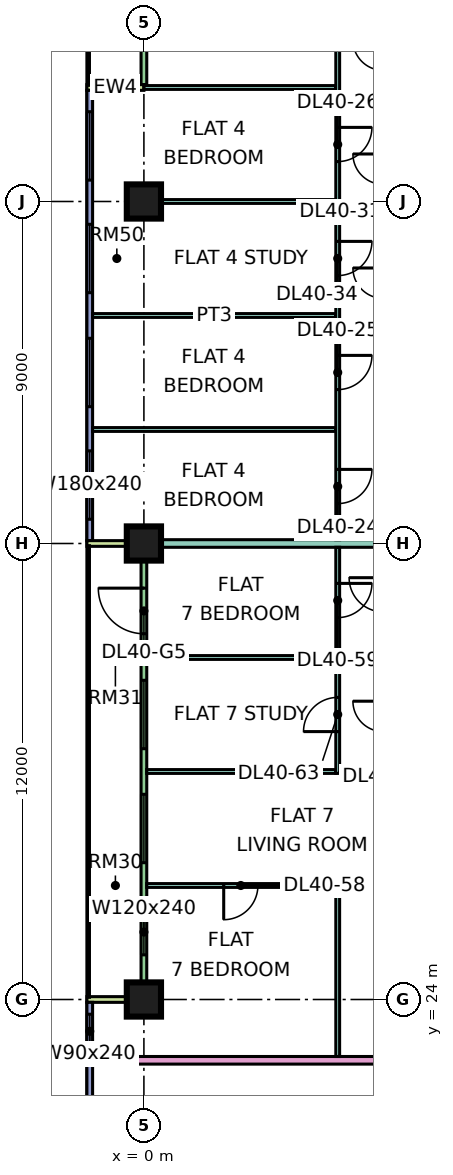
"""IFC4 building model, lengths in metres.
Left out: names, types, materials, properties, quantities, classifications, styles, units other than length and angle.
Written with IfcOpenShell. Run it as: python <this file> out.ifc"""

import sys

from ifc_helpers import new_model, si_unit, direction, frame, frame_2d, origin, origin_2d, place, context, subcontext, project, spatial, rectangle, extrude, element, fill, save


model = new_model("IFC4")
c1 = context("Model", 3, precision=1e-05, world=origin(), true_north=direction((0.0, 1.0)))
c2 = subcontext(c1, "Body", "Model", "MODEL_VIEW")
j1 = project(units=[si_unit("LENGTHUNIT", "METRE"), si_unit("PLANEANGLEUNIT", "RADIAN")], contexts=[c1])
p1 = place(None, origin())
s1 = spatial("IfcSite", under=j1, at=p1, CompositionType="ELEMENT")
p2 = place(p1, origin())
s2 = spatial("IfcBuilding", under=s1, at=p2, CompositionType="ELEMENT")
p3 = place(p2, frame((0.0, 0.0, 176.15)))
s3 = spatial("IfcBuildingStorey", under=s2, at=p3, CompositionType="ELEMENT", Elevation=176.15)
p4 = place(p3, frame((0.0, 24.0, 0.0), z_axis=(0.0, 0.0, 1.0), x_axis=(1.0, 0.0, 0.0)))
e1 = element("IfcColumn", 1, at=p4, inside=s3, PredefinedType="COLUMN", context=c2, shape_type="SweptSolid", body=[
    extrude(rectangle(XDim=0.9, YDim=0.9, at=origin_2d()), origin(), (0.0, 0.0, 1.0), 3.75),
])
p5 = place(p3, frame((0.0, 36.0, 0.0), z_axis=(0.0, 0.0, 1.0), x_axis=(1.0, 0.0, 0.0)))
e2 = element("IfcColumn", 2, at=p5, inside=s3, PredefinedType="COLUMN", context=c2, shape_type="SweptSolid", body=[
    extrude(rectangle(XDim=0.9, YDim=0.9, at=origin_2d()), origin(), (0.0, 0.0, 1.0), 3.75),
])
p6 = place(p3, frame((0.0, 45.0, 0.0), z_axis=(0.0, 0.0, 1.0), x_axis=(1.0, 0.0, 0.0)))
e3 = element("IfcColumn", 3, at=p6, inside=s3, PredefinedType="COLUMN", context=c2, shape_type="SweptSolid", body=[
    extrude(rectangle(XDim=0.9, YDim=0.9, at=origin_2d()), origin(), (0.0, 0.0, 1.0), 3.75),
])
p7 = place(p3, frame((0.0, 61.425, 0.0), z_axis=(0.0, 0.0, 1.0), x_axis=(0.0, -1.0, 0.0)))
e4 = element("IfcWall", 4, at=p7, inside=s3, PredefinedType="SOLIDWALL", context=c2, shape_type="SweptSolid", body=[
    extrude(rectangle(XDim=13.35, YDim=0.15, at=frame_2d((6.675, 0.0))), origin(), (0.0, 0.0, 1.0), 3.35),
])
p8 = place(p7, frame((0.262, 0.0, 0.45)))
e5 = element("IfcOpeningElement", 5, at=p8, cuts=e4, PredefinedType="OPENING", context=c2, shape_type="SweptSolid", body=[
    extrude(rectangle(XDim=0.9, YDim=2.4, at=frame_2d((0.45, 1.2))), frame((0.0, 0.085, 0.0), z_axis=(0.0, -1.0, 0.0), x_axis=(1.0, 0.0, 0.0)), (0.0, 0.0, 1.0), 0.17),
])
p9 = place(p7, frame((2.025, 0.0, 0.0)))
e6 = element("IfcOpeningElement", 6, at=p9, cuts=e4, PredefinedType="OPENING", context=c2, shape_type="SweptSolid", body=[
    extrude(rectangle(XDim=1.8, YDim=2.4, at=frame_2d((0.9, 1.2))), frame((0.0, 0.085, 0.0), z_axis=(0.0, -1.0, 0.0), x_axis=(1.0, 0.0, 0.0)), (0.0, 0.0, 1.0), 0.17),
])
p10 = place(p7, frame((5.05, 0.0, 0.45)))
e7 = element("IfcOpeningElement", 7, at=p10, cuts=e4, PredefinedType="OPENING", context=c2, shape_type="SweptSolid", body=[
    extrude(rectangle(XDim=1.2, YDim=2.4, at=frame_2d((0.6, 1.2))), frame((0.0, 0.085, 0.0), z_axis=(0.0, -1.0, 0.0), x_axis=(1.0, 0.0, 0.0)), (0.0, 0.0, 1.0), 0.17),
])
p11 = place(p7, frame((9.163, 0.0, 0.45)))
e8 = element("IfcOpeningElement", 8, at=p11, cuts=e4, PredefinedType="OPENING", context=c2, shape_type="SweptSolid", body=[
    extrude(rectangle(XDim=3.0, YDim=2.4, at=frame_2d((1.5, 1.2))), frame((0.0, 0.085, 0.0), z_axis=(0.0, -1.0, 0.0), x_axis=(1.0, 0.0, 0.0)), (0.0, 0.0, 1.0), 0.17),
])
p12 = place(p3, frame((-1.5, 48.0, 0.0), z_axis=(0.0, 0.0, 1.0), x_axis=(1.0, 0.0, 0.0)))
e9 = element("IfcWall", 9, at=p12, inside=s3, PredefinedType="SOLIDWALL", context=c2, shape_type="SweptSolid", body=[
    extrude(rectangle(XDim=1.5, YDim=0.15, at=frame_2d((0.75, 0.0))), origin(), (0.0, 0.0, 1.0), 3.35),
])
p13 = place(p3, frame((-1.425, 47.925, 0.0), z_axis=(0.0, 0.0, 1.0), x_axis=(0.0, -1.0, 0.0)))
e10 = element("IfcWall", 10, at=p13, inside=s3, PredefinedType="SOLIDWALL", context=c2, shape_type="SweptSolid", body=[
    extrude(rectangle(XDim=11.85, YDim=0.15, at=frame_2d((5.925, 0.0))), origin(), (0.0, 0.0, 1.0), 3.35),
])
p14 = place(p13, frame((0.562, 0.0, 0.45)))
e11 = element("IfcOpeningElement", 11, at=p14, cuts=e10, PredefinedType="OPENING", context=c2, shape_type="SweptSolid", body=[
    extrude(rectangle(XDim=1.8, YDim=2.4, at=frame_2d((0.9, 1.2))), frame((0.0, 0.085, 0.0), z_axis=(0.0, -1.0, 0.0), x_axis=(1.0, 0.0, 0.0)), (0.0, 0.0, 1.0), 0.17),
])
p15 = place(p13, frame((3.525, 0.0, 0.45)))
e12 = element("IfcOpeningElement", 12, at=p15, cuts=e10, PredefinedType="OPENING", context=c2, shape_type="SweptSolid", body=[
    extrude(rectangle(XDim=1.8, YDim=2.4, at=frame_2d((0.9, 1.2))), frame((0.0, 0.085, 0.0), z_axis=(0.0, -1.0, 0.0), x_axis=(1.0, 0.0, 0.0)), (0.0, 0.0, 1.0), 0.17),
])
p16 = place(p13, frame((6.525, 0.0, 0.45)))
e13 = element("IfcOpeningElement", 13, at=p16, cuts=e10, PredefinedType="OPENING", context=c2, shape_type="SweptSolid", body=[
    extrude(rectangle(XDim=1.8, YDim=2.4, at=frame_2d((0.9, 1.2))), frame((0.0, 0.085, 0.0), z_axis=(0.0, -1.0, 0.0), x_axis=(1.0, 0.0, 0.0)), (0.0, 0.0, 1.0), 0.17),
])
p17 = place(p13, frame((9.488, 0.0, 0.45)))
e14 = element("IfcOpeningElement", 14, at=p17, cuts=e10, PredefinedType="OPENING", context=c2, shape_type="SweptSolid", body=[
    extrude(rectangle(XDim=1.8, YDim=2.4, at=frame_2d((0.9, 1.2))), frame((0.0, 0.085, 0.0), z_axis=(0.0, -1.0, 0.0), x_axis=(1.0, 0.0, 0.0)), (0.0, 0.0, 1.0), 0.17),
])
p18 = place(p3, frame((0.0, 35.925, 0.0), z_axis=(0.0, 0.0, 1.0), x_axis=(0.0, -1.0, 0.0)))
e15 = element("IfcWall", 15, at=p18, inside=s3, PredefinedType="SOLIDWALL", context=c2, shape_type="SweptSolid", body=[
    extrude(rectangle(XDim=11.85, YDim=0.15, at=frame_2d((5.925, 0.0))), origin(), (0.0, 0.0, 1.0), 3.35),
])
p19 = place(p18, frame((1.1, 0.0, 0.0)))
e16 = element("IfcOpeningElement", 16, at=p19, cuts=e15, PredefinedType="OPENING", context=c2, shape_type="SweptSolid", body=[
    extrude(rectangle(XDim=1.2, YDim=2.4, at=frame_2d((0.6, 1.2))), frame((0.0, 0.085, 0.0), z_axis=(0.0, -1.0, 0.0), x_axis=(1.0, 0.0, 0.0)), (0.0, 0.0, 1.0), 0.17),
])
p20 = place(p18, frame((3.525, 0.0, 0.45)))
e17 = element("IfcOpeningElement", 17, at=p20, cuts=e15, PredefinedType="OPENING", context=c2, shape_type="SweptSolid", body=[
    extrude(rectangle(XDim=1.8, YDim=2.4, at=frame_2d((0.9, 1.2))), frame((0.0, 0.085, 0.0), z_axis=(0.0, -1.0, 0.0), x_axis=(1.0, 0.0, 0.0)), (0.0, 0.0, 1.0), 0.17),
])
p21 = place(p18, frame((6.525, 0.0, 0.45)))
e18 = element("IfcOpeningElement", 18, at=p21, cuts=e15, PredefinedType="OPENING", context=c2, shape_type="SweptSolid", body=[
    extrude(rectangle(XDim=1.8, YDim=2.4, at=frame_2d((0.9, 1.2))), frame((0.0, 0.085, 0.0), z_axis=(0.0, -1.0, 0.0), x_axis=(1.0, 0.0, 0.0)), (0.0, 0.0, 1.0), 0.17),
])
p22 = place(p18, frame((9.55, 0.0, 0.45)))
e19 = element("IfcOpeningElement", 19, at=p22, cuts=e15, PredefinedType="OPENING", context=c2, shape_type="SweptSolid", body=[
    extrude(rectangle(XDim=1.2, YDim=2.4, at=frame_2d((0.6, 1.2))), frame((0.0, 0.085, 0.0), z_axis=(0.0, -1.0, 0.0), x_axis=(1.0, 0.0, 0.0)), (0.0, 0.0, 1.0), 0.17),
])
for number, where, z_axis, x_axis in (
    (20, (-1.5, 36.0, 0.0), (0.0, 0.0, 1.0), (1.0, 0.0, 0.0)),
    (21, (-1.5, 24.0, 0.0), (0.0, 0.0, 1.0), (1.0, 0.0, 0.0)),
):
    element("IfcWall", number, at=place(p3, frame(where, z_axis=z_axis, x_axis=x_axis)), inside=s3, PredefinedType="SOLIDWALL", context=c2, shape_type="SweptSolid", body=[
        extrude(rectangle(XDim=1.5, YDim=0.15, at=frame_2d((0.75, 0.0))), origin(), (0.0, 0.0, 1.0), 3.35),
    ])
p23 = place(p3, frame((-1.425, 23.925, 0.0), z_axis=(0.0, 0.0, 1.0), x_axis=(0.0, -1.0, 0.0)))
e22 = element("IfcWall", 22, at=p23, inside=s3, PredefinedType="SOLIDWALL", context=c2, shape_type="SweptSolid", body=[
    extrude(rectangle(XDim=11.425, YDim=0.15, at=frame_2d((5.712, 0.0))), origin(), (0.0, 0.0, 1.0), 3.35),
])
p24 = place(p23, frame((0.312, 0.0, 0.45)))
e23 = element("IfcOpeningElement", 23, at=p24, cuts=e22, PredefinedType="OPENING", context=c2, shape_type="SweptSolid", body=[
    extrude(rectangle(XDim=0.9, YDim=2.4, at=frame_2d((0.45, 1.2))), frame((0.0, 0.085, 0.0), z_axis=(0.0, -1.0, 0.0), x_axis=(1.0, 0.0, 0.0)), (0.0, 0.0, 1.0), 0.17),
])
p25 = place(p23, frame((6.175, 0.0, 0.45)))
e24 = element("IfcOpeningElement", 24, at=p25, cuts=e22, PredefinedType="OPENING", context=c2, shape_type="SweptSolid", body=[
    extrude(rectangle(XDim=3.0, YDim=2.4, at=frame_2d((1.5, 1.2))), frame((0.0, 0.085, 0.0), z_axis=(0.0, -1.0, 0.0), x_axis=(1.0, 0.0, 0.0)), (0.0, 0.0, 1.0), 0.17),
])
p26 = place(p3, frame((-1.351, 39.0, 0.0), z_axis=(0.0, 0.0, 1.0), x_axis=(1.0, 0.0, 0.0)))
e25 = element("IfcWall", 25, at=p26, inside=s3, PredefinedType="PARTITIONING", context=c2, shape_type="SweptSolid", body=[
    extrude(rectangle(XDim=6.401, YDim=0.1, at=frame_2d((3.201, 0.0))), origin(), (0.0, 0.0, 1.0), 3.35),
])
p27 = place(p3, frame((-1.35, 22.4, 0.0), z_axis=(0.0, 0.0, 1.0), x_axis=(1.0, 0.0, 0.0)))
e26 = element("IfcWall", 26, at=p27, inside=s3, PredefinedType="PARTITIONING", context=c2, shape_type="SweptSolid", body=[
    extrude(rectangle(XDim=10.85, YDim=0.2, at=frame_2d((5.425, 0.0))), origin(), (0.0, 0.0, 1.0), 3.35),
])
e27 = element("IfcWall", 27, at=p5, inside=s3, PredefinedType="PARTITIONING", context=c2, shape_type="SweptSolid", body=[
    extrude(rectangle(XDim=9.5, YDim=0.2, at=frame_2d((4.75, 0.0))), origin(), (0.0, 0.0, 1.0), 3.35),
])
p28 = place(p3, frame((-1.35, 42.0, 0.0), z_axis=(0.0, 0.0, 1.0), x_axis=(1.0, 0.0, 0.0)))
e28 = element("IfcWall", 28, at=p28, inside=s3, PredefinedType="PARTITIONING", context=c2, shape_type="SweptSolid", body=[
    extrude(rectangle(XDim=6.4, YDim=0.1, at=frame_2d((3.2, 0.0))), origin(), (0.0, 0.0, 1.0), 3.35),
])
e29 = element("IfcWall", 29, at=p6, inside=s3, PredefinedType="PARTITIONING", context=c2, shape_type="SweptSolid", body=[
    extrude(rectangle(XDim=5.05, YDim=0.1, at=frame_2d((2.525, 0.0))), origin(), (0.0, 0.0, 1.0), 3.35),
])
p29 = place(p3, frame((0.0, 48.0, 0.0), z_axis=(0.0, 0.0, 1.0), x_axis=(1.0, 0.0, 0.0)))
e30 = element("IfcWall", 30, at=p29, inside=s3, PredefinedType="PARTITIONING", context=c2, shape_type="SweptSolid", body=[
    extrude(rectangle(XDim=5.05, YDim=0.1, at=frame_2d((2.525, 0.0))), origin(), (0.0, 0.0, 1.0), 3.35),
])
p30 = place(p3, frame((0.074, 27.0, 0.0), z_axis=(0.0, 0.0, 1.0), x_axis=(1.0, 0.0, 0.0)))
e31 = element("IfcWall", 31, at=p30, inside=s3, PredefinedType="PARTITIONING", context=c2, shape_type="SweptSolid", body=[
    extrude(rectangle(XDim=5.076, YDim=0.1, at=frame_2d((2.538, 0.0))), origin(), (0.0, 0.0, 1.0), 3.35),
])
p31 = place(p30, frame((2.026, 0.0, 0.0)))
e32 = element("IfcOpeningElement", 32, at=p31, cuts=e31, PredefinedType="OPENING", context=c2, shape_type="SweptSolid", body=[
    extrude(rectangle(XDim=0.9, YDim=2.1, at=frame_2d((0.45, 1.05))), frame((0.0, 0.06, 0.0), z_axis=(0.0, -1.0, 0.0), x_axis=(1.0, 0.0, 0.0)), (0.0, 0.0, 1.0), 0.12),
])
for number, where, z_axis, x_axis in (
    (33, (0.074, 30.0, 0.0), (0.0, 0.0, 1.0), (1.0, 0.0, 0.0)),
    (34, (0.074, 33.0, 0.0), (0.0, 0.0, 1.0), (1.0, 0.0, 0.0)),
):
    element("IfcWall", number, at=place(p3, frame(where, z_axis=z_axis, x_axis=x_axis)), inside=s3, PredefinedType="PARTITIONING", context=c2, shape_type="SweptSolid", body=[
        extrude(rectangle(XDim=4.976, YDim=0.1, at=frame_2d((2.488, 0.0))), origin(), (0.0, 0.0, 1.0), 3.35),
    ])
p32 = place(p3, frame((5.1, 22.5, 0.0), z_axis=(0.0, 0.0, 1.0), x_axis=(0.0, 1.0, 0.0)))
e35 = element("IfcWall", 35, at=p32, inside=s3, PredefinedType="PARTITIONING", context=c2, shape_type="SweptSolid", body=[
    extrude(rectangle(XDim=4.45, YDim=0.1, at=frame_2d((2.225, 0.0))), origin(), (0.0, 0.0, 1.0), 3.35),
])
p33 = place(p3, frame((5.1, 29.95, 0.0), z_axis=(0.0, 0.0, 1.0), x_axis=(0.0, 1.0, 0.0)))
e36 = element("IfcWall", 36, at=p33, inside=s3, PredefinedType="PARTITIONING", context=c2, shape_type="SweptSolid", body=[
    extrude(rectangle(XDim=5.95, YDim=0.1, at=frame_2d((2.975, 0.0))), origin(), (0.0, 0.0, 1.0), 3.35),
])
p34 = place(p33, frame((4.1, 0.0, 0.0)))
e37 = element("IfcOpeningElement", 37, at=p34, cuts=e36, PredefinedType="OPENING", context=c2, shape_type="SweptSolid", body=[
    extrude(rectangle(XDim=0.9, YDim=2.1, at=frame_2d((0.45, 1.05))), frame((0.0, 0.06, 0.0), z_axis=(0.0, -1.0, 0.0), x_axis=(1.0, 0.0, 0.0)), (0.0, 0.0, 1.0), 0.12),
])
p35 = place(p33, frame((1.1, 0.0, 0.0)))
e38 = element("IfcOpeningElement", 38, at=p35, cuts=e36, PredefinedType="OPENING", context=c2, shape_type="SweptSolid", body=[
    extrude(rectangle(XDim=0.9, YDim=2.1, at=frame_2d((0.45, 1.05))), frame((0.0, 0.06, 0.0), z_axis=(0.0, -1.0, 0.0), x_axis=(1.0, 0.0, 0.0)), (0.0, 0.0, 1.0), 0.12),
])
p36 = place(p3, frame((5.1, 36.1, 0.0), z_axis=(0.0, 0.0, 1.0), x_axis=(0.0, 1.0, 0.0)))
e39 = element("IfcWall", 39, at=p36, inside=s3, PredefinedType="PARTITIONING", context=c2, shape_type="SweptSolid", body=[
    extrude(rectangle(XDim=26.826, YDim=0.1, at=frame_2d((13.413, 0.0))), origin(), (0.0, 0.0, 1.0), 3.35),
])
p37 = place(p36, frame((0.95, 0.0, 0.0)))
e40 = element("IfcOpeningElement", 40, at=p37, cuts=e39, PredefinedType="OPENING", context=c2, shape_type="SweptSolid", body=[
    extrude(rectangle(XDim=0.9, YDim=2.1, at=frame_2d((0.45, 1.05))), frame((0.0, 0.06, 0.0), z_axis=(0.0, -1.0, 0.0), x_axis=(1.0, 0.0, 0.0)), (0.0, 0.0, 1.0), 0.12),
])
p38 = place(p36, frame((3.95, 0.0, 0.0)))
e41 = element("IfcOpeningElement", 41, at=p38, cuts=e39, PredefinedType="OPENING", context=c2, shape_type="SweptSolid", body=[
    extrude(rectangle(XDim=0.9, YDim=2.1, at=frame_2d((0.45, 1.05))), frame((0.0, 0.06, 0.0), z_axis=(0.0, -1.0, 0.0), x_axis=(1.0, 0.0, 0.0)), (0.0, 0.0, 1.0), 0.12),
])
p39 = place(p36, frame((9.95, 0.0, 0.0)))
e42 = element("IfcOpeningElement", 42, at=p39, cuts=e39, PredefinedType="OPENING", context=c2, shape_type="SweptSolid", body=[
    extrude(rectangle(XDim=0.9, YDim=2.1, at=frame_2d((0.45, 1.05))), frame((0.0, 0.06, 0.0), z_axis=(0.0, -1.0, 0.0), x_axis=(1.0, 0.0, 0.0)), (0.0, 0.0, 1.0), 0.12),
])
p40 = place(p36, frame((21.95, 0.0, 0.0)))
e43 = element("IfcOpeningElement", 43, at=p40, cuts=e39, PredefinedType="OPENING", context=c2, shape_type="SweptSolid", body=[
    extrude(rectangle(XDim=0.9, YDim=2.1, at=frame_2d((0.45, 1.05))), frame((0.0, 0.06, 0.0), z_axis=(0.0, -1.0, 0.0), x_axis=(1.0, 0.0, 0.0)), (0.0, 0.0, 1.0), 0.12),
])
p41 = place(p36, frame((24.95, 0.0, 0.0)))
e44 = element("IfcOpeningElement", 44, at=p41, cuts=e39, PredefinedType="OPENING", context=c2, shape_type="SweptSolid", body=[
    extrude(rectangle(XDim=0.9, YDim=2.1, at=frame_2d((0.45, 1.05))), frame((0.0, 0.06, 0.0), z_axis=(0.0, -1.0, 0.0), x_axis=(1.0, 0.0, 0.0)), (0.0, 0.0, 1.0), 0.12),
])
p42 = place(p36, frame((15.95, 0.0, 0.0)))
e45 = element("IfcOpeningElement", 45, at=p42, cuts=e39, PredefinedType="OPENING", context=c2, shape_type="SweptSolid", body=[
    extrude(rectangle(XDim=0.9, YDim=2.1, at=frame_2d((0.45, 1.05))), frame((0.0, 0.06, 0.0), z_axis=(0.0, -1.0, 0.0), x_axis=(1.0, 0.0, 0.0)), (0.0, 0.0, 1.0), 0.12),
])
p43 = place(p36, frame((6.95, 0.0, 0.0)))
e46 = element("IfcOpeningElement", 46, at=p43, cuts=e39, PredefinedType="OPENING", context=c2, shape_type="SweptSolid", body=[
    extrude(rectangle(XDim=0.9, YDim=2.1, at=frame_2d((0.45, 1.05))), frame((0.0, 0.06, 0.0), z_axis=(0.0, -1.0, 0.0), x_axis=(1.0, 0.0, 0.0)), (0.0, 0.0, 1.0), 0.12),
])
p44 = place(p14, origin())
e47 = element("IfcWindow", 47, at=p44, inside=s3, PartitioningType="SINGLE_PANEL", PredefinedType="WINDOW", context=c2, shape_type="SweptSolid", body=[
    extrude(rectangle(XDim=1.8, YDim=2.4, at=frame_2d((0.9, 1.2))), frame((0.0, 0.03, 0.0), z_axis=(0.0, -1.0, 0.0), x_axis=(1.0, 0.0, 0.0)), (0.0, 0.0, 1.0), 0.06),
])
fill(e11, e47)
p45 = place(p15, origin())
e48 = element("IfcWindow", 48, at=p45, inside=s3, PartitioningType="SINGLE_PANEL", PredefinedType="WINDOW", context=c2, shape_type="SweptSolid", body=[
    extrude(rectangle(XDim=1.8, YDim=2.4, at=frame_2d((0.9, 1.2))), frame((0.0, 0.03, 0.0), z_axis=(0.0, -1.0, 0.0), x_axis=(1.0, 0.0, 0.0)), (0.0, 0.0, 1.0), 0.06),
])
fill(e12, e48)
p46 = place(p16, origin())
e49 = element("IfcWindow", 49, at=p46, inside=s3, PartitioningType="SINGLE_PANEL", PredefinedType="WINDOW", context=c2, shape_type="SweptSolid", body=[
    extrude(rectangle(XDim=1.8, YDim=2.4, at=frame_2d((0.9, 1.2))), frame((0.0, 0.03, 0.0), z_axis=(0.0, -1.0, 0.0), x_axis=(1.0, 0.0, 0.0)), (0.0, 0.0, 1.0), 0.06),
])
fill(e13, e49)
p47 = place(p17, origin())
e50 = element("IfcWindow", 50, at=p47, inside=s3, PartitioningType="SINGLE_PANEL", PredefinedType="WINDOW", context=c2, shape_type="SweptSolid", body=[
    extrude(rectangle(XDim=1.8, YDim=2.4, at=frame_2d((0.9, 1.2))), frame((0.0, 0.03, 0.0), z_axis=(0.0, -1.0, 0.0), x_axis=(1.0, 0.0, 0.0)), (0.0, 0.0, 1.0), 0.06),
])
fill(e14, e50)
p48 = place(p19, frame((1.2, 0.0, 0.0), z_axis=(0.0, 0.0, 1.0), x_axis=(-1.0, 0.0, 0.0)))
e51 = element("IfcDoor", 51, at=p48, inside=s3, OperationType="DOUBLE_DOOR_SINGLE_SWING", PredefinedType="DOOR", context=c2, shape_type="SweptSolid", body=[
    extrude(rectangle(XDim=1.2, YDim=2.4, at=frame_2d((0.6, 1.2))), frame((0.0, 0.025, 0.0), z_axis=(0.0, -1.0, 0.0), x_axis=(1.0, 0.0, 0.0)), (0.0, 0.0, 1.0), 0.05),
])
fill(e16, e51)
p49 = place(p20, origin())
e52 = element("IfcWindow", 52, at=p49, inside=s3, PartitioningType="SINGLE_PANEL", PredefinedType="WINDOW", context=c2, shape_type="SweptSolid", body=[
    extrude(rectangle(XDim=1.8, YDim=2.4, at=frame_2d((0.9, 1.2))), frame((0.0, 0.03, 0.0), z_axis=(0.0, -1.0, 0.0), x_axis=(1.0, 0.0, 0.0)), (0.0, 0.0, 1.0), 0.06),
])
fill(e17, e52)
p50 = place(p21, origin())
e53 = element("IfcWindow", 53, at=p50, inside=s3, PartitioningType="SINGLE_PANEL", PredefinedType="WINDOW", context=c2, shape_type="SweptSolid", body=[
    extrude(rectangle(XDim=1.8, YDim=2.4, at=frame_2d((0.9, 1.2))), frame((0.0, 0.03, 0.0), z_axis=(0.0, -1.0, 0.0), x_axis=(1.0, 0.0, 0.0)), (0.0, 0.0, 1.0), 0.06),
])
fill(e18, e53)
p51 = place(p22, origin())
e54 = element("IfcWindow", 54, at=p51, inside=s3, PartitioningType="SINGLE_PANEL", PredefinedType="WINDOW", context=c2, shape_type="SweptSolid", body=[
    extrude(rectangle(XDim=1.2, YDim=2.4, at=frame_2d((0.6, 1.2))), frame((0.0, 0.03, 0.0), z_axis=(0.0, -1.0, 0.0), x_axis=(1.0, 0.0, 0.0)), (0.0, 0.0, 1.0), 0.06),
])
fill(e19, e54)
p52 = place(p24, origin())
e55 = element("IfcWindow", 55, at=p52, inside=s3, PartitioningType="SINGLE_PANEL", PredefinedType="WINDOW", context=c2, shape_type="SweptSolid", body=[
    extrude(rectangle(XDim=0.9, YDim=2.4, at=frame_2d((0.45, 1.2))), frame((0.0, 0.03, 0.0), z_axis=(0.0, -1.0, 0.0), x_axis=(1.0, 0.0, 0.0)), (0.0, 0.0, 1.0), 0.06),
])
fill(e23, e55)
p53 = place(p37, origin())
e56 = element("IfcDoor", 56, at=p53, inside=s3, OperationType="SINGLE_SWING_RIGHT", PredefinedType="DOOR", context=c2, shape_type="SweptSolid", body=[
    extrude(rectangle(XDim=0.9, YDim=2.1, at=frame_2d((0.45, 1.05))), frame((0.0, 0.025, 0.0), z_axis=(0.0, -1.0, 0.0), x_axis=(1.0, 0.0, 0.0)), (0.0, 0.0, 1.0), 0.05),
])
fill(e40, e56)
p54 = place(p38, origin())
e57 = element("IfcDoor", 57, at=p54, inside=s3, OperationType="SINGLE_SWING_RIGHT", PredefinedType="DOOR", context=c2, shape_type="SweptSolid", body=[
    extrude(rectangle(XDim=0.9, YDim=2.1, at=frame_2d((0.45, 1.05))), frame((0.0, 0.025, 0.0), z_axis=(0.0, -1.0, 0.0), x_axis=(1.0, 0.0, 0.0)), (0.0, 0.0, 1.0), 0.05),
])
fill(e41, e57)
p55 = place(p39, origin())
e58 = element("IfcDoor", 58, at=p55, inside=s3, OperationType="SINGLE_SWING_RIGHT", PredefinedType="DOOR", context=c2, shape_type="SweptSolid", body=[
    extrude(rectangle(XDim=0.9, YDim=2.1, at=frame_2d((0.45, 1.05))), frame((0.0, 0.025, 0.0), z_axis=(0.0, -1.0, 0.0), x_axis=(1.0, 0.0, 0.0)), (0.0, 0.0, 1.0), 0.05),
])
fill(e42, e58)
p56 = place(p43, origin())
e59 = element("IfcDoor", 59, at=p56, inside=s3, OperationType="SINGLE_SWING_RIGHT", PredefinedType="DOOR", context=c2, shape_type="SweptSolid", body=[
    extrude(rectangle(XDim=0.9, YDim=2.1, at=frame_2d((0.45, 1.05))), frame((0.0, 0.025, 0.0), z_axis=(0.0, -1.0, 0.0), x_axis=(1.0, 0.0, 0.0)), (0.0, 0.0, 1.0), 0.05),
])
fill(e46, e59)
p57 = place(p31, frame((0.9, 0.0, 0.0), z_axis=(0.0, 0.0, 1.0), x_axis=(-1.0, 0.0, 0.0)))
e60 = element("IfcDoor", 60, at=p57, inside=s3, OperationType="SINGLE_SWING_LEFT", PredefinedType="DOOR", context=c2, shape_type="SweptSolid", body=[
    extrude(rectangle(XDim=0.9, YDim=2.1, at=frame_2d((0.45, 1.05))), frame((0.0, 0.025, 0.0), z_axis=(0.0, -1.0, 0.0), x_axis=(1.0, 0.0, 0.0)), (0.0, 0.0, 1.0), 0.05),
])
fill(e32, e60)
p58 = place(p34, origin())
e61 = element("IfcDoor", 61, at=p58, inside=s3, OperationType="SINGLE_SWING_RIGHT", PredefinedType="DOOR", context=c2, shape_type="SweptSolid", body=[
    extrude(rectangle(XDim=0.9, YDim=2.1, at=frame_2d((0.45, 1.05))), frame((0.0, 0.025, 0.0), z_axis=(0.0, -1.0, 0.0), x_axis=(1.0, 0.0, 0.0)), (0.0, 0.0, 1.0), 0.05),
])
fill(e37, e61)
p59 = place(p35, origin())
e62 = element("IfcDoor", 62, at=p59, inside=s3, OperationType="SINGLE_SWING_LEFT", PredefinedType="DOOR", context=c2, shape_type="SweptSolid", body=[
    extrude(rectangle(XDim=0.9, YDim=2.1, at=frame_2d((0.45, 1.05))), frame((0.0, 0.025, 0.0), z_axis=(0.0, -1.0, 0.0), x_axis=(1.0, 0.0, 0.0)), (0.0, 0.0, 1.0), 0.05),
])
fill(e38, e62)
save(model, sys.argv[1])
